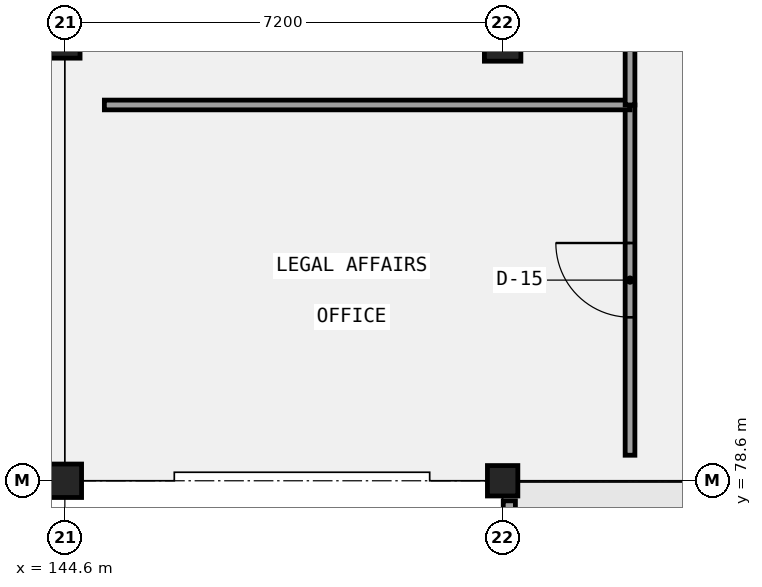
"""IFC4 building model, lengths in metres.
Left out: names, types, materials, properties, quantities, classifications, styles, units other than length and angle.
Written with IfcOpenShell. Run it as: python <this file> out.ifc"""

import sys

from ifc_helpers import new_model, si_unit, direction, frame, frame_2d, origin, origin_2d, place, context, subcontext, project, spatial, rectangle, extrude, element, fill, save


model = new_model("IFC4")
c1 = context("Model", 3, precision=1e-05, world=origin(), true_north=direction((0.0, 1.0)))
c2 = subcontext(c1, "Body", "Model", "MODEL_VIEW")
j1 = project(units=[si_unit("LENGTHUNIT", "METRE"), si_unit("PLANEANGLEUNIT", "RADIAN")], contexts=[c1])
p1 = place(None, origin())
s1 = spatial("IfcSite", under=j1, at=p1, CompositionType="ELEMENT")
p2 = place(p1, origin())
s2 = spatial("IfcBuilding", under=s1, at=p2, CompositionType="ELEMENT")
p3 = place(p2, frame((0.0, 0.0, 22.2)))
s3 = spatial("IfcBuildingStorey", under=s2, at=p3, CompositionType="ELEMENT", Elevation=22.2)
p4 = place(p3, frame((144.6, 78.6, 0.0), z_axis=(0.0, 0.0, 1.0), x_axis=(1.0, 0.0, 0.0)))
e1 = element("IfcColumn", 1, at=p4, inside=s3, PredefinedType="COLUMN", context=c2, shape_type="SweptSolid", body=[
    extrude(rectangle(XDim=0.55, YDim=0.55, at=origin_2d()), origin(), (0.0, 0.0, 1.0), 4.2),
])
for number, where, z_axis, x_axis in (
    (2, (144.6, 85.8, 0.0), (0.0, 0.0, 1.0), (1.0, 0.0, 0.0)),
    (3, (151.8, 78.6, 0.0), (0.0, 0.0, 1.0), (1.0, 0.0, 0.0)),
):
    element("IfcColumn", number, at=place(p3, frame(where, z_axis=z_axis, x_axis=x_axis)), inside=s3, PredefinedType="COLUMN", context=c2, shape_type="SweptSolid", body=[
        extrude(rectangle(XDim=0.5, YDim=0.5, at=origin_2d()), origin(), (0.0, 0.0, 1.0), 4.2),
    ])
p5 = place(p3, frame((151.8, 85.8, 0.0), z_axis=(0.0, 0.0, 1.0), x_axis=(1.0, 0.0, 0.0)))
e4 = element("IfcColumn", 4, at=p5, inside=s3, PredefinedType="COLUMN", context=c2, shape_type="SweptSolid", body=[
    extrude(rectangle(XDim=0.6, YDim=0.6, at=origin_2d()), origin(), (0.0, 0.0, 1.0), 4.2),
])
p6 = place(p3, frame((108.45, 78.6, 0.0), z_axis=(0.0, 0.0, 1.0), x_axis=(1.0, 0.0, 0.0)))
e5 = element("IfcWall", 5, at=p6, inside=s3, PredefinedType="SOLIDWALL", context=c2, shape_type="SweptSolid", body=[
    extrude(rectangle(XDim=36.3, YDim=0.3, at=frame_2d((18.15, 0.0))), origin(), (0.0, 0.0, 1.0), 2.92),
])
p7 = place(p6, frame((10.45, 0.0, 0.0)))
e6 = element("IfcOpeningElement", 6, at=p7, cuts=e5, PredefinedType="OPENING", context=c2, shape_type="SweptSolid", body=[
    extrude(rectangle(XDim=1.1, YDim=2.2, at=frame_2d((0.55, 1.1))), frame((0.0, 0.16, 0.0), z_axis=(0.0, -1.0, 0.0), x_axis=(1.0, 0.0, 0.0)), (0.0, 0.0, 1.0), 0.32),
])
p8 = place(p6, frame((3.325, 0.0, 0.95)))
e7 = element("IfcOpeningElement", 7, at=p8, cuts=e5, PredefinedType="OPENING", context=c2, shape_type="SweptSolid", body=[
    extrude(rectangle(XDim=0.85, YDim=1.65, at=frame_2d((0.425, 0.825))), frame((0.0, 0.16, 0.0), z_axis=(0.0, -1.0, 0.0), x_axis=(1.0, 0.0, 0.0)), (0.0, 0.0, 1.0), 0.32),
])
p9 = place(p6, frame((17.65, 0.0, 0.95)))
e8 = element("IfcOpeningElement", 8, at=p9, cuts=e5, PredefinedType="OPENING", context=c2, shape_type="SweptSolid", body=[
    extrude(rectangle(XDim=1.0, YDim=1.65, at=frame_2d((0.5, 0.825))), frame((0.0, 0.16, 0.0), z_axis=(0.0, -1.0, 0.0), x_axis=(1.0, 0.0, 0.0)), (0.0, 0.0, 1.0), 0.32),
])
p10 = place(p6, frame((24.775, 0.0, 0.95)))
e9 = element("IfcOpeningElement", 9, at=p10, cuts=e5, PredefinedType="OPENING", context=c2, shape_type="SweptSolid", body=[
    extrude(rectangle(XDim=1.15, YDim=1.4, at=frame_2d((0.575, 0.7))), frame((0.0, 0.16, 0.0), z_axis=(0.0, -1.0, 0.0), x_axis=(1.0, 0.0, 0.0)), (0.0, 0.0, 1.0), 0.32),
])
p11 = place(p6, frame((31.975, 0.0, 0.95)))
e10 = element("IfcOpeningElement", 10, at=p11, cuts=e5, PredefinedType="OPENING", context=c2, shape_type="SweptSolid", body=[
    extrude(rectangle(XDim=1.15, YDim=1.65, at=frame_2d((0.575, 0.825))), frame((0.0, 0.16, 0.0), z_axis=(0.0, -1.0, 0.0), x_axis=(1.0, 0.0, 0.0)), (0.0, 0.0, 1.0), 0.32),
])
p12 = place(p3, frame((151.91, 42.82, 0.0), z_axis=(0.0, 0.0, 1.0), x_axis=(0.0, 1.0, 0.0)))
e11 = element("IfcWall", 11, at=p12, inside=s3, PredefinedType="PARAPET", context=c2, shape_type="SweptSolid", body=[
    extrude(rectangle(XDim=35.45, YDim=0.2, at=frame_2d((17.725, 0.0))), origin(), (0.0, 0.0, 1.0), 1.12),
])
p13 = place(p3, frame((153.895, 79.02, 0.0), z_axis=(0.0, 0.0, 1.0), x_axis=(0.0, 1.0, 0.0)))
e12 = element("IfcWall", 12, at=p13, inside=s3, PredefinedType="PARTITIONING", context=c2, shape_type="SweptSolid", body=[
    extrude(rectangle(XDim=5.76, YDim=0.16, at=frame_2d((2.88, 0.0))), origin(), (0.0, 0.0, 1.0), 3.92),
])
p14 = place(p13, frame((2.27, 0.0, 0.0)))
e13 = element("IfcOpeningElement", 13, at=p14, cuts=e12, PredefinedType="OPENING", context=c2, shape_type="SweptSolid", body=[
    extrude(rectangle(XDim=1.22, YDim=2.35, at=frame_2d((0.61, 1.175))), frame((0.0, 0.09, 0.0), z_axis=(0.0, -1.0, 0.0), x_axis=(1.0, 0.0, 0.0)), (0.0, 0.0, 1.0), 0.18),
])
p15 = place(p3, frame((145.25, 84.78, 0.0), z_axis=(0.0, 0.0, 1.0), x_axis=(1.0, 0.0, 0.0)))
e14 = element("IfcWall", 14, at=p15, inside=s3, PredefinedType="PARTITIONING", context=c2, shape_type="SweptSolid", body=[
    extrude(rectangle(XDim=8.645, YDim=0.16, at=frame_2d((4.323, 0.0))), origin(), (0.0, 0.0, 1.0), 3.92),
])
p16 = place(p3, frame((153.895, 84.78, 0.0), z_axis=(0.0, 0.0, 1.0), x_axis=(0.0, 1.0, 0.0)))
e15 = element("IfcWall", 15, at=p16, inside=s3, PredefinedType="PARTITIONING", context=c2, shape_type="SweptSolid", body=[
    extrude(rectangle(XDim=5.76, YDim=0.16, at=frame_2d((2.88, 0.0))), origin(), (0.0, 0.0, 1.0), 3.92),
])
p17 = place(p16, frame((2.2, 0.0, 0.0)))
e16 = element("IfcOpeningElement", 16, at=p17, cuts=e15, PredefinedType="OPENING", context=c2, shape_type="SweptSolid", body=[
    extrude(rectangle(XDim=1.36, YDim=2.1, at=frame_2d((0.68, 1.05))), frame((0.0, 0.09, 0.0), z_axis=(0.0, -1.0, 0.0), x_axis=(1.0, 0.0, 0.0)), (0.0, 0.0, 1.0), 0.18),
])
p18 = place(p14, frame((1.22, 0.0, 0.0), z_axis=(0.0, 0.0, 1.0), x_axis=(-1.0, 0.0, 0.0)))
e17 = element("IfcDoor", 17, at=p18, inside=s3, OperationType="SINGLE_SWING_RIGHT", PredefinedType="DOOR", context=c2, shape_type="SweptSolid", body=[
    extrude(rectangle(XDim=1.22, YDim=2.35, at=frame_2d((0.61, 1.175))), frame((0.0, 0.025, 0.0), z_axis=(0.0, -1.0, 0.0), x_axis=(1.0, 0.0, 0.0)), (0.0, 0.0, 1.0), 0.05),
])
fill(e13, e17)
save(model, sys.argv[1])
